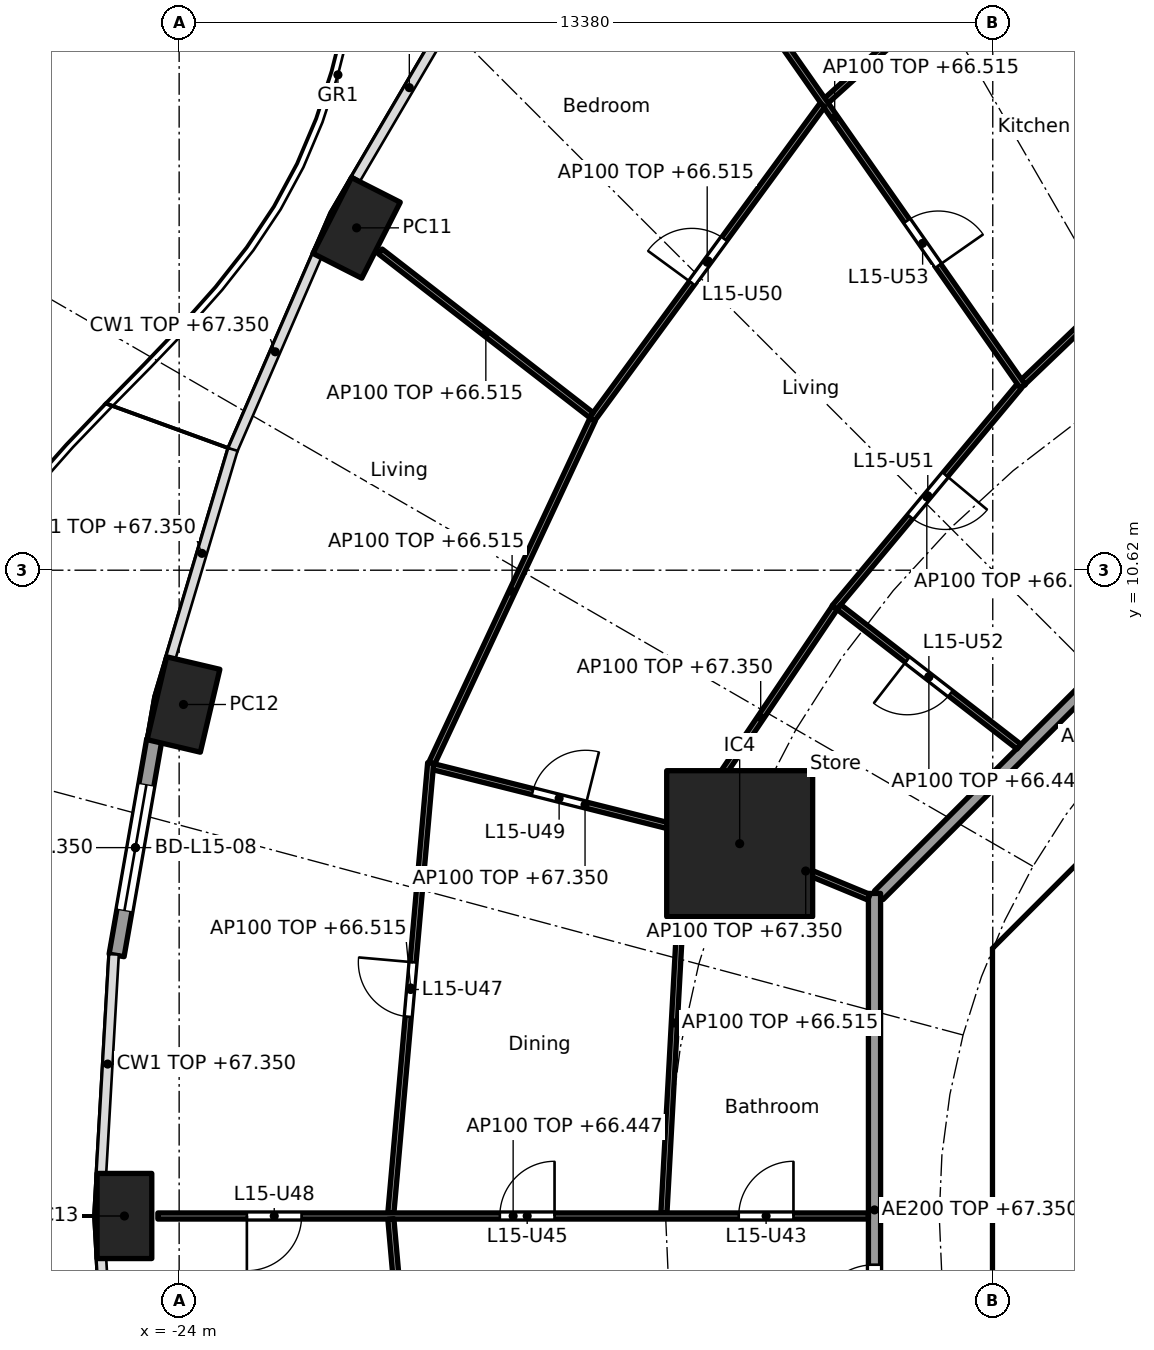
"""IFC4 building model, lengths in metres.
Left out: names, types, materials, properties, quantities, classifications, styles, units other than length and angle.
Written with IfcOpenShell. Run it as: python <this file> out.ifc"""

import sys

from ifc_helpers import new_model, si_unit, direction, frame, frame_2d, origin, origin_2d, place, context, subcontext, project, spatial, polyline, rectangle, hollow_rectangle, outline, extrude, element, fill, save


model = new_model("IFC4")
c1 = context("Model", 3, precision=1e-05, world=origin(), true_north=direction((0.0, 1.0)))
c2 = subcontext(c1, "Body", "Model", "MODEL_VIEW")
j1 = project(units=[si_unit("LENGTHUNIT", "METRE"), si_unit("PLANEANGLEUNIT", "RADIAN")], contexts=[c1])
p1 = place(None, origin())
s1 = spatial("IfcSite", under=j1, at=p1, CompositionType="ELEMENT")
p2 = place(p1, origin())
s2 = spatial("IfcBuilding", under=s1, at=p2, CompositionType="ELEMENT")
p3 = place(p2, frame((0.0, 0.0, 64.0)))
s3 = spatial("IfcBuildingStorey", under=s2, at=p3, CompositionType="ELEMENT", Elevation=64.0)
for number, where, z_axis, x_axis in (
    (1, (-21.082, 16.25, 0.0), (0.0, 0.0, 1.0), (-0.452, -0.892, 0.0)),
    (2, (-23.929, 8.412, 0.0), (0.0, 0.0, 1.0), (-0.229, -0.973, 0.0)),
    (3, (-24.9, 0.0, 0.0), (0.0, 0.0, 1.0), (0.0, -1.0, 0.0)),
):
    element("IfcColumn", number, at=place(p3, frame(where, z_axis=z_axis, x_axis=x_axis)), inside=s3, PredefinedType="COLUMN", context=c2, shape_type="SweptSolid", body=[
        extrude(hollow_rectangle(XDim=1.4, YDim=0.9, WallThickness=0.05, at=origin_2d()), origin(), (0.0, 0.0, 1.0), 3.7),
    ])
p4 = place(p3, frame((-14.782, 6.123, 0.0), z_axis=(0.0, 0.0, 1.0), x_axis=(1.0, 0.0, 0.0)))
e4 = element("IfcColumn", 4, at=p4, inside=s3, PredefinedType="COLUMN", context=c2, shape_type="SweptSolid", body=[
    extrude(rectangle(XDim=2.4, YDim=2.4, at=origin_2d()), origin(), (0.0, 0.0, 1.0), 3.7),
])
p5 = place(p3, frame((-25.029, 4.286, 0.0), z_axis=(0.0, 0.0, 1.0), x_axis=(0.172217377323, 0.98505897029, 0.0)))
e5 = element("IfcWall", 5, at=p5, inside=s3, PredefinedType="SOLIDWALL", context=c2, shape_type="SweptSolid", body=[
    extrude(rectangle(XDim=3.598, YDim=0.25, at=frame_2d((1.799, 0.0))), origin(), (0.0, 0.0, 1.0), 3.35),
])
p6 = place(p5, frame((0.749, 0.0, 0.0)))
e6 = element("IfcOpeningElement", 6, at=p6, cuts=e5, PredefinedType="OPENING", context=c2, shape_type="SweptSolid", body=[
    extrude(rectangle(XDim=2.1, YDim=2.4, at=frame_2d((1.05, 1.2))), frame((0.0, 0.135, 0.0), z_axis=(0.0, -1.0, 0.0), x_axis=(1.0, 0.0, 0.0)), (0.0, 0.0, 1.0), 0.27),
])
p7 = place(p3, frame((-4.613, 9.988, 0.0), z_axis=(0.0, 0.0, 1.0), x_axis=(-0.707106781187, -0.707106781187, 0.0)))
e7 = element("IfcWall", 7, at=p7, inside=s3, PredefinedType="SHEAR", context=c2, shape_type="SweptSolid", body=[
    extrude(rectangle(XDim=7.602, YDim=0.6, at=frame_2d((3.801, 0.0))), origin(), (0.0, 0.0, 1.0), 3.35),
])
p8 = place(p7, frame((0.351, 0.0, 0.0)))
e8 = element("IfcOpeningElement", 8, at=p8, cuts=e7, PredefinedType="OPENING", context=c2, shape_type="SweptSolid", body=[
    extrude(rectangle(XDim=1.1, YDim=2.1, at=frame_2d((0.55, 1.05))), frame((0.0, 0.31, 0.0), z_axis=(0.0, -1.0, 0.0), x_axis=(1.0, 0.0, 0.0)), (0.0, 0.0, 1.0), 0.62),
])
p9 = place(p3, frame((-10.325, 3.801, 0.0), z_axis=(0.0, 0.0, 1.0), x_axis=(0.0, -1.0, 0.0)))
e9 = element("IfcWall", 9, at=p9, inside=s3, PredefinedType="SHEAR", context=c2, shape_type="SweptSolid", body=[
    extrude(rectangle(XDim=7.602, YDim=0.6, at=frame_2d((3.801, 0.0))), origin(), (0.0, 0.0, 1.0), 3.35),
])
p10 = place(p9, frame((0.651, 0.0, 0.0)))
e10 = element("IfcOpeningElement", 10, at=p10, cuts=e9, PredefinedType="OPENING", context=c2, shape_type="SweptSolid", body=[
    extrude(rectangle(XDim=1.5, YDim=2.1, at=frame_2d((0.75, 1.05))), frame((0.0, 0.31, 0.0), z_axis=(0.0, -1.0, 0.0), x_axis=(1.0, 0.0, 0.0)), (0.0, 0.0, 1.0), 0.62),
])
p11 = place(p9, frame((5.451, 0.0, 0.0)))
e11 = element("IfcOpeningElement", 11, at=p11, cuts=e9, PredefinedType="OPENING", context=c2, shape_type="SweptSolid", body=[
    extrude(rectangle(XDim=1.5, YDim=2.1, at=frame_2d((0.75, 1.05))), frame((0.0, 0.31, 0.0), z_axis=(0.0, -1.0, 0.0), x_axis=(1.0, 0.0, 0.0)), (0.0, 0.0, 1.0), 0.62),
])
p12 = place(p3, origin())
e12 = element("IfcWall", 12, at=p12, inside=s3, PredefinedType="SHEAR", context=c2, shape_type="SweptSolid", body=[
    extrude(outline(polyline([(-10.2, 4.825), (-9.776, 4.401), (-10.025, 4.152), (-10.025, 3.801), (-10.625, 3.801), (-10.625, 4.401), (-10.2, 4.825)])), origin(), (0.0, 0.0, 1.0), 3.35),
])
p13 = place(p3, frame((-10.025, 4.0, 0.0), z_axis=(0.0, 0.0, 1.0), x_axis=(1.0, 0.0, 0.0)))
e13 = element("IfcWall", 13, at=p13, inside=s3, PredefinedType="PARTITIONING", context=c2, shape_type="SweptSolid", body=[
    extrude(rectangle(XDim=3.325, YDim=0.2, at=frame_2d((1.662, 0.0))), origin(), (0.0, 0.0, 1.0), 3.35),
])
p14 = place(p3, frame((-6.139, 14.829, 0.0), z_axis=(0.0, 0.0, 1.0), x_axis=(-0.327178799566, 0.944962450637, 0.0)))
e14 = element("IfcWall", 14, at=p14, inside=s3, PredefinedType="PARTITIONING", context=c2, shape_type="SweptSolid", body=[
    extrude(rectangle(XDim=13.517, YDim=0.2, at=frame_2d((6.759, 0.0))), origin(), (0.0, 0.0, 1.0), 2.515),
])
p15 = place(p3, frame((-5.275, 12.494, 0.0), z_axis=(0.0, 0.0, 1.0), x_axis=(-0.707106781187, -0.707106781187, 0.0)))
e15 = element("IfcWall", 15, at=p15, inside=s3, PredefinedType="PARTITIONING", context=c2, shape_type="SweptSolid", body=[
    extrude(rectangle(XDim=10.209, YDim=0.2, at=frame_2d((5.104, 0.0))), origin(), (0.0, 0.0, 1.0), 3.35),
])
p16 = place(p3, frame((-12.565, 5.304, 0.0), z_axis=(0.0, 0.0, 1.0), x_axis=(0.0, -1.0, 0.0)))
e16 = element("IfcWall", 16, at=p16, inside=s3, PredefinedType="PARTITIONING", context=c2, shape_type="SweptSolid", body=[
    extrude(rectangle(XDim=10.409, YDim=0.2, at=frame_2d((5.205, 0.0))), origin(), (0.0, 0.0, 1.0), 3.35),
])
p17 = place(p16, frame((6.106, 0.0, 0.0)))
e17 = element("IfcOpeningElement", 17, at=p17, cuts=e16, PredefinedType="OPENING", context=c2, shape_type="SweptSolid", body=[
    extrude(rectangle(XDim=1.0, YDim=2.1, at=frame_2d((0.5, 1.05))), frame((0.0, 0.11, 0.0), z_axis=(0.0, -1.0, 0.0), x_axis=(1.0, 0.0, 0.0)), (0.0, 0.0, 1.0), 0.22),
])
p18 = place(p3, frame((-6.912, 16.782, 0.0), z_axis=(0.0, 0.0, 1.0), x_axis=(-0.722775679202, -0.691082713975, 0.0)))
e18 = element("IfcWall", 18, at=p18, inside=s3, PredefinedType="PARTITIONING", context=c2, shape_type="SweptSolid", body=[
    extrude(rectangle(XDim=4.437, YDim=0.1, at=frame_2d((2.219, 0.0))), origin(), (0.0, 0.0, 1.0), 2.515),
])
p19 = place(p3, frame((-8.861, 22.407, 0.0), z_axis=(0.0, 0.0, 1.0), x_axis=(-0.741713303551, -0.670717060567, 0.0)))
e19 = element("IfcWall", 19, at=p19, inside=s3, PredefinedType="PARTITIONING", context=c2, shape_type="SweptSolid", body=[
    extrude(rectangle(XDim=6.059, YDim=0.1, at=frame_2d((3.03, 0.0))), origin(), (0.0, 0.0, 1.0), 2.515),
])
p20 = place(p19, frame((2.58, 0.0, 0.0)))
e20 = element("IfcOpeningElement", 20, at=p20, cuts=e19, PredefinedType="OPENING", context=c2, shape_type="SweptSolid", body=[
    extrude(rectangle(XDim=0.9, YDim=2.1, at=frame_2d((0.45, 1.05))), frame((0.0, 0.06, 0.0), z_axis=(0.0, -1.0, 0.0), x_axis=(1.0, 0.0, 0.0)), (0.0, 0.0, 1.0), 0.12),
])
p21 = place(p3, frame((-10.126, 13.641, 0.0), z_axis=(0.0, 0.0, 1.0), x_axis=(-0.57313289907, 0.819462433552, 0.0)))
e21 = element("IfcWall", 21, at=p21, inside=s3, PredefinedType="PARTITIONING", context=c2, shape_type="SweptSolid", body=[
    extrude(rectangle(XDim=10.794, YDim=0.1, at=frame_2d((5.397, 0.0))), origin(), (0.0, 0.0, 1.0), 2.515),
])
p22 = place(p21, frame((2.424, 0.0, 0.0)))
e22 = element("IfcOpeningElement", 22, at=p22, cuts=e21, PredefinedType="OPENING", context=c2, shape_type="SweptSolid", body=[
    extrude(rectangle(XDim=0.9, YDim=2.1, at=frame_2d((0.45, 1.05))), frame((0.0, 0.06, 0.0), z_axis=(0.0, -1.0, 0.0), x_axis=(1.0, 0.0, 0.0)), (0.0, 0.0, 1.0), 0.12),
])
p23 = place(p3, frame((-10.187, 13.643, 0.0), z_axis=(0.0, 0.0, 1.0), x_axis=(-0.640807748916, -0.767701393075, 0.0)))
e23 = element("IfcWall", 23, at=p23, inside=s3, PredefinedType="PARTITIONING", context=c2, shape_type="SweptSolid", body=[
    extrude(rectangle(XDim=4.737, YDim=0.1, at=frame_2d((2.368, 0.0))), origin(), (0.0, 0.0, 1.0), 2.515),
])
p24 = place(p23, frame((1.893, 0.0, 0.0)))
e24 = element("IfcOpeningElement", 24, at=p24, cuts=e23, PredefinedType="OPENING", context=c2, shape_type="SweptSolid", body=[
    extrude(rectangle(XDim=0.9, YDim=2.1, at=frame_2d((0.45, 1.05))), frame((0.0, 0.06, 0.0), z_axis=(0.0, -1.0, 0.0), x_axis=(1.0, 0.0, 0.0)), (0.0, 0.0, 1.0), 0.12),
])
p25 = place(p3, frame((-13.421, 18.269, 0.0), z_axis=(0.0, 0.0, 1.0), x_axis=(-0.591206785834, -0.806520016109, 0.0)))
e25 = element("IfcWall", 25, at=p25, inside=s3, PredefinedType="PARTITIONING", context=c2, shape_type="SweptSolid", body=[
    extrude(rectangle(XDim=6.41, YDim=0.1, at=frame_2d((3.205, 0.0))), origin(), (0.0, 0.0, 1.0), 2.515),
])
p26 = place(p25, frame((2.73, 0.0, 0.0)))
e26 = element("IfcOpeningElement", 26, at=p26, cuts=e25, PredefinedType="OPENING", context=c2, shape_type="SweptSolid", body=[
    extrude(rectangle(XDim=0.9, YDim=2.1, at=frame_2d((0.45, 1.05))), frame((0.0, 0.06, 0.0), z_axis=(0.0, -1.0, 0.0), x_axis=(1.0, 0.0, 0.0)), (0.0, 0.0, 1.0), 0.12),
])
p27 = place(p3, frame((-10.19, 7.719, 0.0), z_axis=(0.0, 0.0, 1.0), x_axis=(-0.790253294643, 0.612780327937, 0.0)))
e27 = element("IfcWall", 27, at=p27, inside=s3, PredefinedType="PARTITIONING", context=c2, shape_type="SweptSolid", body=[
    extrude(rectangle(XDim=3.746, YDim=0.1, at=frame_2d((1.873, 0.0))), origin(), (0.0, 0.0, 1.0), 2.447),
])
p28 = place(p27, frame((1.423, 0.0, 0.0)))
e28 = element("IfcOpeningElement", 28, at=p28, cuts=e27, PredefinedType="OPENING", context=c2, shape_type="SweptSolid", body=[
    extrude(rectangle(XDim=0.9, YDim=2.1, at=frame_2d((0.45, 1.05))), frame((0.0, 0.06, 0.0), z_axis=(0.0, -1.0, 0.0), x_axis=(1.0, 0.0, 0.0)), (0.0, 0.0, 1.0), 0.12),
])
p29 = place(p3, frame((-13.218, 10.004, 0.0), z_axis=(0.0, 0.0, 1.0), x_axis=(-0.559126445155, -0.82908239538, 0.0)))
e29 = element("IfcWall", 29, at=p29, inside=s3, PredefinedType="PARTITIONING", context=c2, shape_type="SweptSolid", body=[
    extrude(rectangle(XDim=4.358, YDim=0.1, at=frame_2d((2.179, 0.0))), origin(), (0.0, 0.0, 1.0), 3.35),
])
p30 = place(p3, frame((-17.221, 13.171, 0.0), z_axis=(0.0, 0.0, 1.0), x_axis=(-0.790258254068, 0.612773932113, 0.0)))
e30 = element("IfcWall", 30, at=p30, inside=s3, PredefinedType="PARTITIONING", context=c2, shape_type="SweptSolid", body=[
    extrude(rectangle(XDim=4.392, YDim=0.1, at=frame_2d((2.196, 0.0))), origin(), (0.0, 0.0, 1.0), 2.515),
])
p31 = place(p3, frame((-17.203, 13.095, 0.0), z_axis=(0.0, 0.0, 1.0), x_axis=(-0.423892287987, -0.905712607942, 0.0)))
e31 = element("IfcWall", 31, at=p31, inside=s3, PredefinedType="PARTITIONING", context=c2, shape_type="SweptSolid", body=[
    extrude(rectangle(XDim=6.238, YDim=0.1, at=frame_2d((3.119, 0.0))), origin(), (0.0, 0.0, 1.0), 2.515),
])
p32 = place(p3, frame((-12.657, 5.243, 0.0), z_axis=(0.0, 0.0, 1.0), x_axis=(-0.923864733477, 0.382719158442, 0.0)))
e32 = element("IfcWall", 32, at=p32, inside=s3, PredefinedType="PARTITIONING", context=c2, shape_type="SweptSolid", body=[
    extrude(rectangle(XDim=2.25, YDim=0.1, at=frame_2d((1.125, 0.0))), origin(), (0.0, 0.0, 1.0), 3.35),
])
p33 = place(p3, frame((-14.831, 6.135, 0.0), z_axis=(0.0, 0.0, 1.0), x_axis=(-0.96988230015, 0.243574062362, 0.0)))
e33 = element("IfcWall", 33, at=p33, inside=s3, PredefinedType="PARTITIONING", context=c2, shape_type="SweptSolid", body=[
    extrude(rectangle(XDim=5.144, YDim=0.1, at=frame_2d((2.572, 0.0))), origin(), (0.0, 0.0, 1.0), 3.35),
])
p34 = place(p33, frame((2.561, 0.0, 0.0)))
e34 = element("IfcOpeningElement", 34, at=p34, cuts=e33, PredefinedType="OPENING", context=c2, shape_type="SweptSolid", body=[
    extrude(rectangle(XDim=0.9, YDim=2.1, at=frame_2d((0.45, 1.05))), frame((0.0, 0.06, 0.0), z_axis=(0.0, -1.0, 0.0), x_axis=(1.0, 0.0, 0.0)), (0.0, 0.0, 1.0), 0.12),
])
p35 = place(p3, frame((-15.686, 6.299, 0.0), z_axis=(0.0, 0.0, 1.0), x_axis=(-0.054651178503, -0.99850550759, 0.0)))
e35 = element("IfcWall", 35, at=p35, inside=s3, PredefinedType="PARTITIONING", context=c2, shape_type="SweptSolid", body=[
    extrude(rectangle(XDim=6.259, YDim=0.1, at=frame_2d((3.129, 0.0))), origin(), (0.0, 0.0, 1.0), 2.515),
])
p36 = place(p3, frame((-19.864, 7.45, 0.0), z_axis=(0.0, 0.0, 1.0), x_axis=(-0.088138375539, -0.996108240483, 0.0)))
e36 = element("IfcWall", 36, at=p36, inside=s3, PredefinedType="PARTITIONING", context=c2, shape_type="SweptSolid", body=[
    extrude(rectangle(XDim=7.429, YDim=0.1, at=frame_2d((3.714, 0.0))), origin(), (0.0, 0.0, 1.0), 2.515),
])
p37 = place(p36, frame((3.29, 0.0, 0.0)))
e37 = element("IfcOpeningElement", 37, at=p37, cuts=e36, PredefinedType="OPENING", context=c2, shape_type="SweptSolid", body=[
    extrude(rectangle(XDim=0.9, YDim=2.1, at=frame_2d((0.45, 1.05))), frame((0.0, 0.06, 0.0), z_axis=(0.0, -1.0, 0.0), x_axis=(1.0, 0.0, 0.0)), (0.0, 0.0, 1.0), 0.12),
])
p38 = place(p3, frame((-12.665, 0.0, 0.0), z_axis=(0.0, 0.0, 1.0), x_axis=(-1.0, 0.0, 0.0)))
e38 = element("IfcWall", 38, at=p38, inside=s3, PredefinedType="PARTITIONING", context=c2, shape_type="SweptSolid", body=[
    extrude(rectangle(XDim=11.685, YDim=0.1, at=frame_2d((5.843, 0.0))), origin(), (0.0, 0.0, 1.0), 2.447),
])
p39 = place(p38, frame((1.233, 0.0, 0.0)))
e39 = element("IfcOpeningElement", 39, at=p39, cuts=e38, PredefinedType="OPENING", context=c2, shape_type="SweptSolid", body=[
    extrude(rectangle(XDim=0.9, YDim=2.1, at=frame_2d((0.45, 1.05))), frame((0.0, 0.06, 0.0), z_axis=(0.0, -1.0, 0.0), x_axis=(1.0, 0.0, 0.0)), (0.0, 0.0, 1.0), 0.12),
])
p40 = place(p38, frame((5.162, 0.0, 0.0)))
e40 = element("IfcOpeningElement", 40, at=p40, cuts=e38, PredefinedType="OPENING", context=c2, shape_type="SweptSolid", body=[
    extrude(rectangle(XDim=0.9, YDim=2.1, at=frame_2d((0.45, 1.05))), frame((0.0, 0.06, 0.0), z_axis=(0.0, -1.0, 0.0), x_axis=(1.0, 0.0, 0.0)), (0.0, 0.0, 1.0), 0.12),
])
p41 = place(p38, frame((9.322, 0.0, 0.0)))
e41 = element("IfcOpeningElement", 41, at=p41, cuts=e38, PredefinedType="OPENING", context=c2, shape_type="SweptSolid", body=[
    extrude(rectangle(XDim=0.9, YDim=2.1, at=frame_2d((0.45, 1.05))), frame((0.0, 0.06, 0.0), z_axis=(0.0, -1.0, 0.0), x_axis=(1.0, 0.0, 0.0)), (0.0, 0.0, 1.0), 0.12),
])
p42 = place(p3, frame((-20.518, -0.05, 0.0), z_axis=(0.0, 0.0, 1.0), x_axis=(0.088143415068, -0.996107794558, 0.0)))
e42 = element("IfcWall", 42, at=p42, inside=s3, PredefinedType="PARTITIONING", context=c2, shape_type="SweptSolid", body=[
    extrude(rectangle(XDim=7.279, YDim=0.1, at=frame_2d((3.64, 0.0))), origin(), (0.0, 0.0, 1.0), 2.515),
])
p43 = place(p6, origin())
e43 = element("IfcDoor", 43, at=p43, inside=s3, OperationType="SLIDING_TO_LEFT", PredefinedType="DOOR", context=c2, shape_type="SweptSolid", body=[
    extrude(rectangle(XDim=2.1, YDim=2.4, at=frame_2d((1.05, 1.2))), frame((0.0, 0.025, 0.0), z_axis=(0.0, -1.0, 0.0), x_axis=(1.0, 0.0, 0.0)), (0.0, 0.0, 1.0), 0.05),
])
fill(e6, e43)
p44 = place(p10, origin())
e44 = element("IfcDoor", 44, at=p44, inside=s3, OperationType="DOUBLE_DOOR_SINGLE_SWING", PredefinedType="DOOR", context=c2, shape_type="SweptSolid", body=[
    extrude(rectangle(XDim=1.5, YDim=2.1, at=frame_2d((0.75, 1.05))), frame((0.0, 0.025, 0.0), z_axis=(0.0, -1.0, 0.0), x_axis=(1.0, 0.0, 0.0)), (0.0, 0.0, 1.0), 0.05),
])
fill(e10, e44)
p45 = place(p17, frame((1.0, 0.0, 0.0), x_axis=(-1.0, 0.0, 0.0)))
e45 = element("IfcDoor", 45, at=p45, inside=s3, OperationType="SINGLE_SWING_LEFT", PredefinedType="DOOR", context=c2, shape_type="SweptSolid", body=[
    extrude(rectangle(XDim=1.0, YDim=2.1, at=frame_2d((0.5, 1.05))), frame((0.0, 0.025, 0.0), z_axis=(0.0, -1.0, 0.0), x_axis=(1.0, 0.0, 0.0)), (0.0, 0.0, 1.0), 0.05),
])
fill(e17, e45)
p46 = place(p39, frame((0.9, 0.0, 0.0), x_axis=(-1.0, 0.0, 0.0)))
e46 = element("IfcDoor", 46, at=p46, inside=s3, OperationType="SINGLE_SWING_RIGHT", PredefinedType="DOOR", context=c2, shape_type="SweptSolid", body=[
    extrude(rectangle(XDim=0.9, YDim=2.1, at=frame_2d((0.45, 1.05))), frame((0.0, 0.025, 0.0), z_axis=(0.0, -1.0, 0.0), x_axis=(1.0, 0.0, 0.0)), (0.0, 0.0, 1.0), 0.05),
])
fill(e39, e46)
p47 = place(p40, frame((0.9, 0.0, 0.0), x_axis=(-1.0, 0.0, 0.0)))
e47 = element("IfcDoor", 47, at=p47, inside=s3, OperationType="SINGLE_SWING_RIGHT", PredefinedType="DOOR", context=c2, shape_type="SweptSolid", body=[
    extrude(rectangle(XDim=0.9, YDim=2.1, at=frame_2d((0.45, 1.05))), frame((0.0, 0.025, 0.0), z_axis=(0.0, -1.0, 0.0), x_axis=(1.0, 0.0, 0.0)), (0.0, 0.0, 1.0), 0.05),
])
fill(e40, e47)
p48 = place(p37, frame((0.9, 0.0, 0.0), x_axis=(-1.0, 0.0, 0.0)))
e48 = element("IfcDoor", 48, at=p48, inside=s3, OperationType="SINGLE_SWING_RIGHT", PredefinedType="DOOR", context=c2, shape_type="SweptSolid", body=[
    extrude(rectangle(XDim=0.9, YDim=2.1, at=frame_2d((0.45, 1.05))), frame((0.0, 0.025, 0.0), z_axis=(0.0, -1.0, 0.0), x_axis=(1.0, 0.0, 0.0)), (0.0, 0.0, 1.0), 0.05),
])
fill(e37, e48)
p49 = place(p41, origin())
e49 = element("IfcDoor", 49, at=p49, inside=s3, OperationType="SINGLE_SWING_RIGHT", PredefinedType="DOOR", context=c2, shape_type="SweptSolid", body=[
    extrude(rectangle(XDim=0.9, YDim=2.1, at=frame_2d((0.45, 1.05))), frame((0.0, 0.025, 0.0), z_axis=(0.0, -1.0, 0.0), x_axis=(1.0, 0.0, 0.0)), (0.0, 0.0, 1.0), 0.05),
])
fill(e41, e49)
p50 = place(p34, frame((0.9, 0.0, 0.0), x_axis=(-1.0, 0.0, 0.0)))
e50 = element("IfcDoor", 50, at=p50, inside=s3, OperationType="SINGLE_SWING_RIGHT", PredefinedType="DOOR", context=c2, shape_type="SweptSolid", body=[
    extrude(rectangle(XDim=0.9, YDim=2.1, at=frame_2d((0.45, 1.05))), frame((0.0, 0.025, 0.0), z_axis=(0.0, -1.0, 0.0), x_axis=(1.0, 0.0, 0.0)), (0.0, 0.0, 1.0), 0.05),
])
fill(e34, e50)
p51 = place(p26, frame((0.9, 0.0, 0.0), x_axis=(-1.0, 0.0, 0.0)))
e51 = element("IfcDoor", 51, at=p51, inside=s3, OperationType="SINGLE_SWING_LEFT", PredefinedType="DOOR", context=c2, shape_type="SweptSolid", body=[
    extrude(rectangle(XDim=0.9, YDim=2.1, at=frame_2d((0.45, 1.05))), frame((0.0, 0.025, 0.0), z_axis=(0.0, -1.0, 0.0), x_axis=(1.0, 0.0, 0.0)), (0.0, 0.0, 1.0), 0.05),
])
fill(e26, e51)
p52 = place(p24, origin())
e52 = element("IfcDoor", 52, at=p52, inside=s3, OperationType="SINGLE_SWING_LEFT", PredefinedType="DOOR", context=c2, shape_type="SweptSolid", body=[
    extrude(rectangle(XDim=0.9, YDim=2.1, at=frame_2d((0.45, 1.05))), frame((0.0, 0.025, 0.0), z_axis=(0.0, -1.0, 0.0), x_axis=(1.0, 0.0, 0.0)), (0.0, 0.0, 1.0), 0.05),
])
fill(e24, e52)
p53 = place(p28, origin())
e53 = element("IfcDoor", 53, at=p53, inside=s3, OperationType="SINGLE_SWING_RIGHT", PredefinedType="DOOR", context=c2, shape_type="SweptSolid", body=[
    extrude(rectangle(XDim=0.9, YDim=2.1, at=frame_2d((0.45, 1.05))), frame((0.0, 0.025, 0.0), z_axis=(0.0, -1.0, 0.0), x_axis=(1.0, 0.0, 0.0)), (0.0, 0.0, 1.0), 0.05),
])
fill(e28, e53)
p54 = place(p22, frame((0.9, 0.0, 0.0), x_axis=(-1.0, 0.0, 0.0)))
e54 = element("IfcDoor", 54, at=p54, inside=s3, OperationType="SINGLE_SWING_RIGHT", PredefinedType="DOOR", context=c2, shape_type="SweptSolid", body=[
    extrude(rectangle(XDim=0.9, YDim=2.1, at=frame_2d((0.45, 1.05))), frame((0.0, 0.025, 0.0), z_axis=(0.0, -1.0, 0.0), x_axis=(1.0, 0.0, 0.0)), (0.0, 0.0, 1.0), 0.05),
])
fill(e22, e54)
save(model, sys.argv[1])
